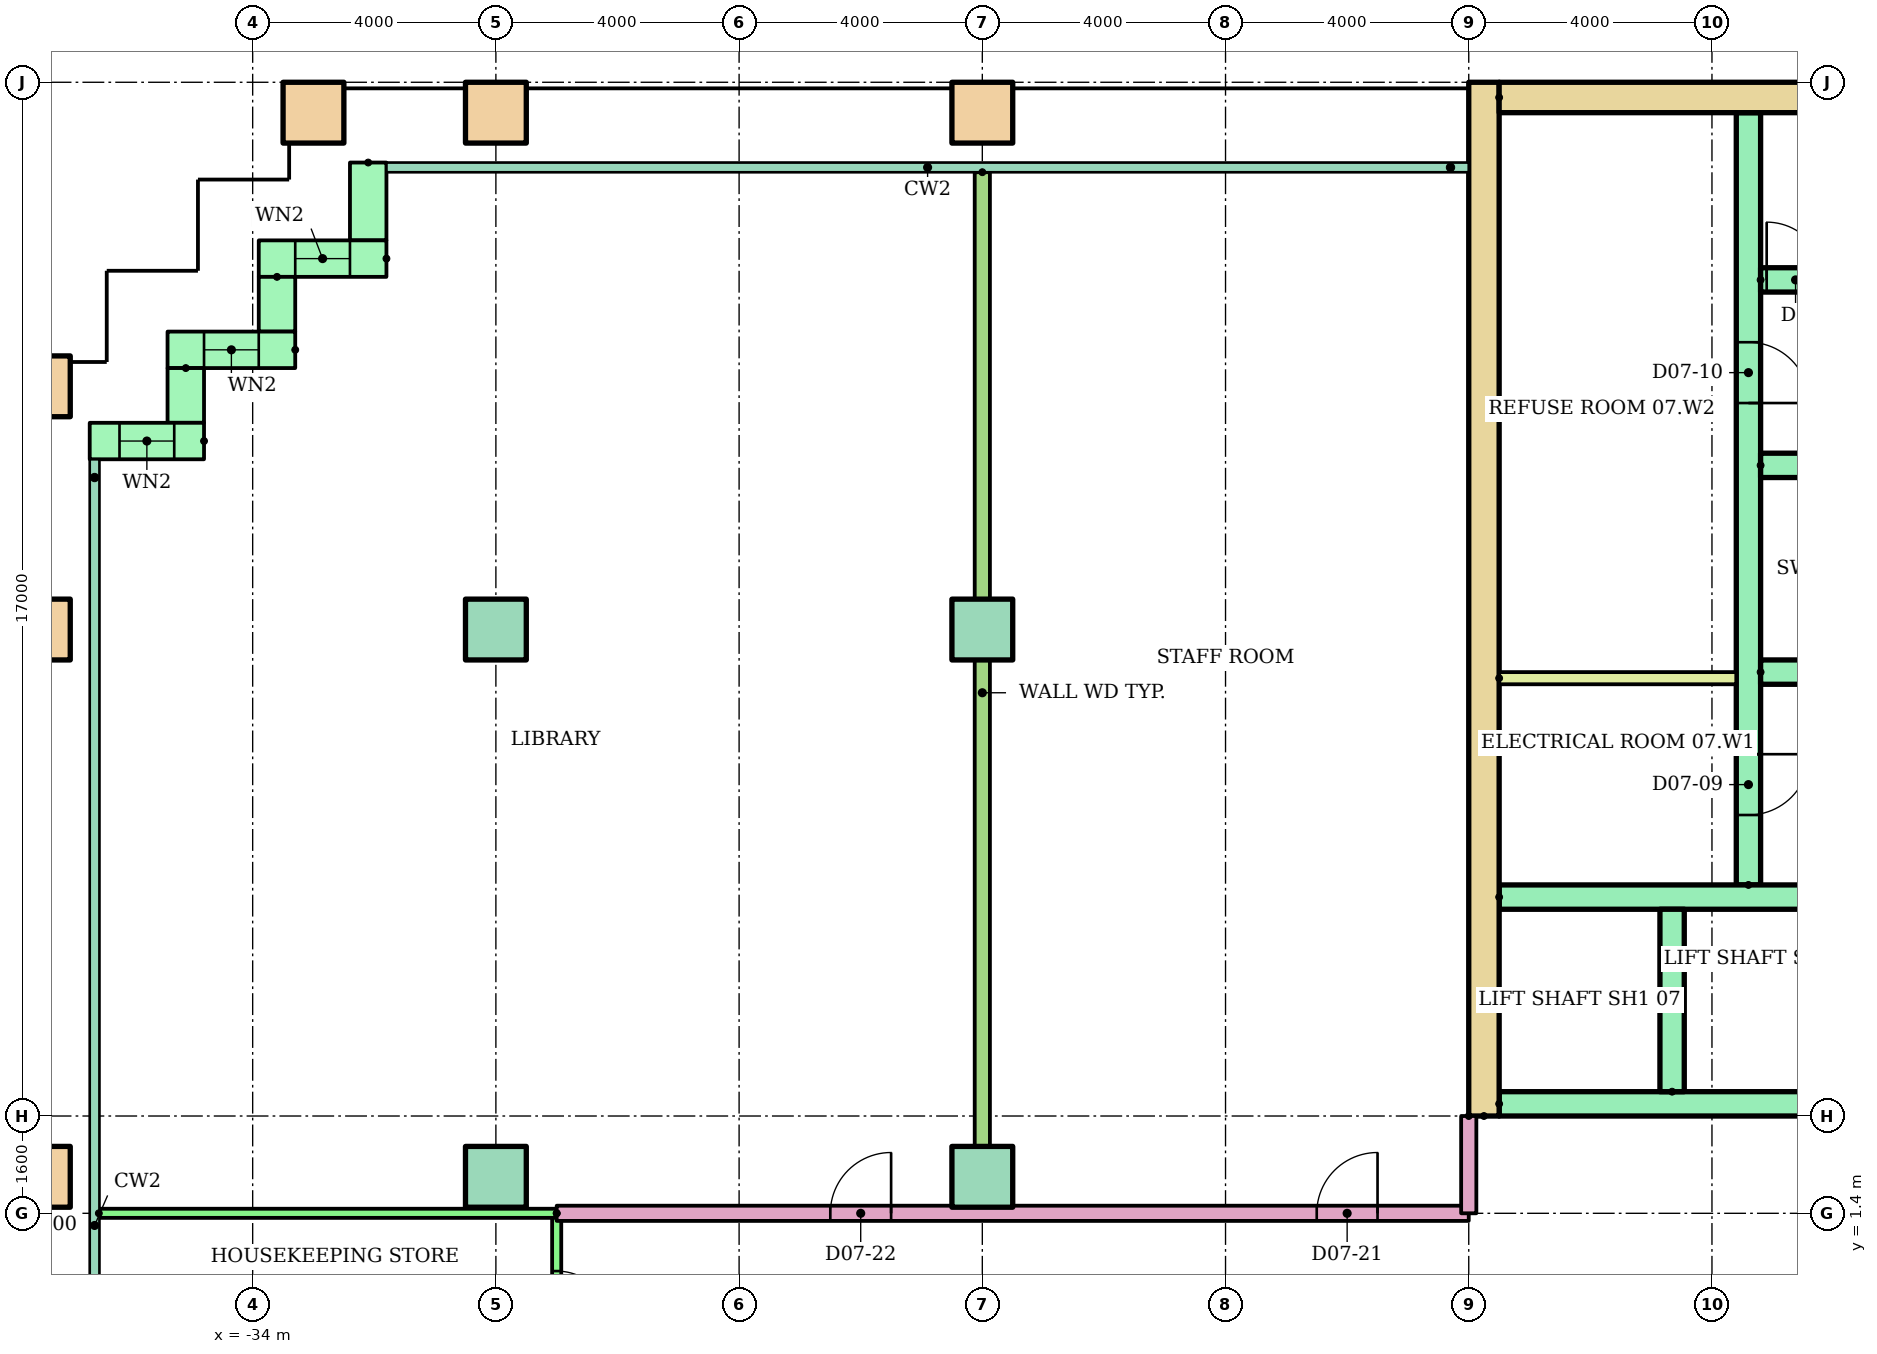
"""IFC4 building model, lengths in metres.
Left out: names, types, materials, properties, quantities, classifications, styles, units other than length and angle.
Written with IfcOpenShell. Run it as: python <this file> out.ifc"""

import sys

from ifc_helpers import new_model, si_unit, direction, frame, frame_2d, origin, origin_2d, place, context, subcontext, project, spatial, rectangle, hollow_rectangle, extrude, element, fill, save


model = new_model("IFC4")
c1 = context("Model", 3, precision=1e-05, world=origin(), true_north=direction((0.0, 1.0)))
c2 = subcontext(c1, "Body", "Model", "MODEL_VIEW")
j1 = project(units=[si_unit("LENGTHUNIT", "METRE"), si_unit("PLANEANGLEUNIT", "RADIAN")], contexts=[c1])
p1 = place(None, origin())
s1 = spatial("IfcSite", under=j1, at=p1, CompositionType="ELEMENT")
p2 = place(p1, origin())
s2 = spatial("IfcBuilding", under=s1, at=p2, CompositionType="ELEMENT")
p3 = place(p2, frame((0.0, 0.0, 29.9)))
s3 = spatial("IfcBuildingStorey", under=s2, at=p3, CompositionType="ELEMENT", Elevation=29.9)
p4 = place(p3, frame((-37.5, 2.0, 0.0)))
e1 = element("IfcColumn", 1, at=p4, inside=s3, PredefinedType="COLUMN", context=c2, shape_type="SweptSolid", body=[
    extrude(hollow_rectangle(XDim=1.0, YDim=1.0, WallThickness=0.05, at=origin_2d()), origin(), (0.0, 0.0, 1.0), 3.9),
])
for number, where in (
    (2, (-30.0, 2.0, 0.0)),
    (3, (-22.0, 2.0, 0.0)),
):
    element("IfcColumn", number, at=place(p3, frame(where)), inside=s3, PredefinedType="COLUMN", context=c2, shape_type="SweptSolid", body=[
        extrude(rectangle(XDim=1.0, YDim=1.0, at=origin_2d()), origin(), (0.0, 0.0, 1.0), 3.9),
    ])
p5 = place(p3, frame((-37.5, 11.0, 0.0)))
e4 = element("IfcColumn", 4, at=p5, inside=s3, PredefinedType="COLUMN", context=c2, shape_type="SweptSolid", body=[
    extrude(hollow_rectangle(XDim=1.0, YDim=1.0, WallThickness=0.05, at=origin_2d()), origin(), (0.0, 0.0, 1.0), 3.9),
])
for number, where in (
    (5, (-30.0, 11.0, 0.0)),
    (6, (-22.0, 11.0, 0.0)),
):
    element("IfcColumn", number, at=place(p3, frame(where)), inside=s3, PredefinedType="COLUMN", context=c2, shape_type="SweptSolid", body=[
        extrude(rectangle(XDim=1.0, YDim=1.0, at=origin_2d()), origin(), (0.0, 0.0, 1.0), 3.9),
    ])
for number, where in (
    (7, (-37.5, 15.0, 0.0)),
    (8, (-33.0, 19.5, 0.0)),
    (9, (-30.0, 19.5, 0.0)),
    (10, (-22.0, 19.5, 0.0)),
):
    element("IfcColumn", number, at=place(p3, frame(where)), inside=s3, PredefinedType="COLUMN", context=c2, shape_type="SweptSolid", body=[
        extrude(hollow_rectangle(XDim=1.0, YDim=1.0, WallThickness=0.05, at=origin_2d()), origin(), (0.0, 0.0, 1.0), 3.9),
    ])
p6 = place(p3, frame((-32.1, 18.68, 0.0), z_axis=(0.0, 0.0, 1.0), x_axis=(0.0, -1.0, 0.0)))
e11 = element("IfcWall", 11, at=p6, inside=s3, PredefinedType="STANDARD", context=c2, shape_type="SweptSolid", body=[
    extrude(rectangle(XDim=1.28, YDim=0.6, at=frame_2d((0.64, 0.0))), origin(), (0.0, 0.0, 1.0), 3.6),
])
p7 = place(p3, frame((-31.8, 17.1, 0.0), z_axis=(0.0, 0.0, 1.0), x_axis=(-1.0, 0.0, 0.0)))
e12 = element("IfcWall", 12, at=p7, inside=s3, PredefinedType="STANDARD", context=c2, shape_type="SweptSolid", body=[
    extrude(rectangle(XDim=2.1, YDim=0.6, at=frame_2d((1.05, 0.0))), origin(), (0.0, 0.0, 1.0), 3.6),
])
p8 = place(p7, frame((0.6, 0.0, 0.9)))
e13 = element("IfcOpeningElement", 13, at=p8, cuts=e12, PredefinedType="OPENING", context=c2, shape_type="SweptSolid", body=[
    extrude(rectangle(XDim=0.9, YDim=1.8, at=frame_2d((0.45, 0.9))), frame((0.0, 0.31, 0.0), z_axis=(0.0, -1.0, 0.0), x_axis=(1.0, 0.0, 0.0)), (0.0, 0.0, 1.0), 0.62),
])
p9 = place(p3, frame((-33.6, 16.8, 0.0), z_axis=(0.0, 0.0, 1.0), x_axis=(0.0, -1.0, 0.0)))
e14 = element("IfcWall", 14, at=p9, inside=s3, PredefinedType="STANDARD", context=c2, shape_type="SweptSolid", body=[
    extrude(rectangle(XDim=0.9, YDim=0.6, at=frame_2d((0.45, 0.0))), origin(), (0.0, 0.0, 1.0), 3.6),
])
p10 = place(p3, frame((-33.3, 15.6, 0.0), z_axis=(0.0, 0.0, 1.0), x_axis=(-1.0, 0.0, 0.0)))
e15 = element("IfcWall", 15, at=p10, inside=s3, PredefinedType="STANDARD", context=c2, shape_type="SweptSolid", body=[
    extrude(rectangle(XDim=2.1, YDim=0.6, at=frame_2d((1.05, 0.0))), origin(), (0.0, 0.0, 1.0), 3.6),
])
p11 = place(p10, frame((0.6, 0.0, 0.9)))
e16 = element("IfcOpeningElement", 16, at=p11, cuts=e15, PredefinedType="OPENING", context=c2, shape_type="SweptSolid", body=[
    extrude(rectangle(XDim=0.9, YDim=1.8, at=frame_2d((0.45, 0.9))), frame((0.0, 0.31, 0.0), z_axis=(0.0, -1.0, 0.0), x_axis=(1.0, 0.0, 0.0)), (0.0, 0.0, 1.0), 0.62),
])
p12 = place(p3, frame((-35.1, 15.3, 0.0), z_axis=(0.0, 0.0, 1.0), x_axis=(0.0, -1.0, 0.0)))
e17 = element("IfcWall", 17, at=p12, inside=s3, PredefinedType="STANDARD", context=c2, shape_type="SweptSolid", body=[
    extrude(rectangle(XDim=0.9, YDim=0.6, at=frame_2d((0.45, 0.0))), origin(), (0.0, 0.0, 1.0), 3.6),
])
p13 = place(p3, frame((-34.8, 14.1, 0.0), z_axis=(0.0, 0.0, 1.0), x_axis=(-1.0, 0.0, 0.0)))
e18 = element("IfcWall", 18, at=p13, inside=s3, PredefinedType="STANDARD", context=c2, shape_type="SweptSolid", body=[
    extrude(rectangle(XDim=1.88, YDim=0.6, at=frame_2d((0.94, 0.0))), origin(), (0.0, 0.0, 1.0), 3.6),
])
p14 = place(p13, frame((0.49, 0.0, 0.9)))
e19 = element("IfcOpeningElement", 19, at=p14, cuts=e18, PredefinedType="OPENING", context=c2, shape_type="SweptSolid", body=[
    extrude(rectangle(XDim=0.9, YDim=1.8, at=frame_2d((0.45, 0.9))), frame((0.0, 0.31, 0.0), z_axis=(0.0, -1.0, 0.0), x_axis=(1.0, 0.0, 0.0)), (0.0, 0.0, 1.0), 0.62),
])
p15 = place(p3, frame((-13.75, 3.0, 0.0), z_axis=(0.0, 0.0, 1.0), x_axis=(0.0, 1.0, 0.0)))
e20 = element("IfcWall", 20, at=p15, inside=s3, PredefinedType="SHEAR", context=c2, shape_type="SweptSolid", body=[
    extrude(rectangle(XDim=17.0, YDim=0.5, at=frame_2d((8.5, 0.0))), origin(), (0.0, 0.0, 1.0), 3.6),
])
p16 = place(p3, frame((-13.5, 19.75, 0.0)))
e21 = element("IfcWall", 21, at=p16, inside=s3, PredefinedType="SHEAR", context=c2, shape_type="SweptSolid", body=[
    extrude(rectangle(XDim=27.0, YDim=0.5, at=frame_2d((13.5, 0.0))), origin(), (0.0, 0.0, 1.0), 3.6),
])
p17 = place(p3, frame((-9.4, 6.8, 0.0), z_axis=(0.0, 0.0, 1.0), x_axis=(0.0, 1.0, 0.0)))
e22 = element("IfcWall", 22, at=p17, inside=s3, PredefinedType="SHEAR", context=c2, shape_type="SweptSolid", body=[
    extrude(rectangle(XDim=12.7, YDim=0.4, at=frame_2d((6.35, 0.0))), origin(), (0.0, 0.0, 1.0), 3.6),
])
p18 = place(p17, frame((1.15, 0.0, 0.0)))
e23 = element("IfcOpeningElement", 23, at=p18, cuts=e22, PredefinedType="OPENING", context=c2, shape_type="SweptSolid", body=[
    extrude(rectangle(XDim=1.0, YDim=2.1, at=frame_2d((0.5, 1.05))), frame((0.0, 0.21, 0.0), z_axis=(0.0, -1.0, 0.0), x_axis=(1.0, 0.0, 0.0)), (0.0, 0.0, 1.0), 0.42),
])
p19 = place(p17, frame((7.925, 0.0, 0.0)))
e24 = element("IfcOpeningElement", 24, at=p19, cuts=e22, PredefinedType="OPENING", context=c2, shape_type="SweptSolid", body=[
    extrude(rectangle(XDim=1.0, YDim=2.1, at=frame_2d((0.5, 1.05))), frame((0.0, 0.21, 0.0), z_axis=(0.0, -1.0, 0.0), x_axis=(1.0, 0.0, 0.0)), (0.0, 0.0, 1.0), 0.42),
])
p20 = place(p3, frame((-13.5, 3.2, 0.0)))
e25 = element("IfcWall", 25, at=p20, inside=s3, PredefinedType="SHEAR", context=c2, shape_type="SweptSolid", body=[
    extrude(rectangle(XDim=27.0, YDim=0.4, at=frame_2d((13.5, 0.0))), origin(), (0.0, 0.0, 1.0), 3.6),
])
p21 = place(p20, frame((6.861, 0.0, 0.0)))
e26 = element("IfcOpeningElement", 26, at=p21, cuts=e25, PredefinedType="OPENING", context=c2, shape_type="SweptSolid", body=[
    extrude(rectangle(XDim=1.1, YDim=2.1, at=frame_2d((0.55, 1.05))), frame((0.0, 0.21, 0.0), z_axis=(0.0, -1.0, 0.0), x_axis=(1.0, 0.0, 0.0)), (0.0, 0.0, 1.0), 0.42),
])
p22 = place(p20, frame((9.906, 0.0, 0.0)))
e27 = element("IfcOpeningElement", 27, at=p22, cuts=e25, PredefinedType="OPENING", context=c2, shape_type="SweptSolid", body=[
    extrude(rectangle(XDim=1.1, YDim=2.1, at=frame_2d((0.55, 1.05))), frame((0.0, 0.21, 0.0), z_axis=(0.0, -1.0, 0.0), x_axis=(1.0, 0.0, 0.0)), (0.0, 0.0, 1.0), 0.42),
])
p23 = place(p20, frame((15.994, 0.0, 0.0)))
e28 = element("IfcOpeningElement", 28, at=p23, cuts=e25, PredefinedType="OPENING", context=c2, shape_type="SweptSolid", body=[
    extrude(rectangle(XDim=1.1, YDim=2.1, at=frame_2d((0.55, 1.05))), frame((0.0, 0.21, 0.0), z_axis=(0.0, -1.0, 0.0), x_axis=(1.0, 0.0, 0.0)), (0.0, 0.0, 1.0), 0.42),
])
p24 = place(p20, frame((19.039, 0.0, 0.0)))
e29 = element("IfcOpeningElement", 29, at=p24, cuts=e25, PredefinedType="OPENING", context=c2, shape_type="SweptSolid", body=[
    extrude(rectangle(XDim=1.1, YDim=2.1, at=frame_2d((0.55, 1.05))), frame((0.0, 0.21, 0.0), z_axis=(0.0, -1.0, 0.0), x_axis=(1.0, 0.0, 0.0)), (0.0, 0.0, 1.0), 0.42),
])
p25 = place(p20, frame((12.6, 0.0, 0.0)))
e30 = element("IfcOpeningElement", 30, at=p25, cuts=e25, PredefinedType="OPENING", context=c2, shape_type="SweptSolid", body=[
    extrude(rectangle(XDim=1.8, YDim=2.1, at=frame_2d((0.9, 1.05))), frame((0.0, 0.21, 0.0), z_axis=(0.0, -1.0, 0.0), x_axis=(1.0, 0.0, 0.0)), (0.0, 0.0, 1.0), 0.42),
])
p26 = place(p3, frame((-13.5, 6.6, 0.0)))
e31 = element("IfcWall", 31, at=p26, inside=s3, PredefinedType="SHEAR", context=c2, shape_type="SweptSolid", body=[
    extrude(rectangle(XDim=11.978, YDim=0.4, at=frame_2d((5.989, 0.0))), origin(), (0.0, 0.0, 1.0), 3.6),
])
p27 = place(p3, frame((-10.656, 3.4, 0.0), z_axis=(0.0, 0.0, 1.0), x_axis=(0.0, 1.0, 0.0)))
e32 = element("IfcWall", 32, at=p27, inside=s3, PredefinedType="SHEAR", context=c2, shape_type="SweptSolid", body=[
    extrude(rectangle(XDim=3.0, YDim=0.4, at=frame_2d((1.5, 0.0))), origin(), (0.0, 0.0, 1.0), 3.6),
])
p28 = place(p3, frame((-9.2, 10.3, 0.0)))
e33 = element("IfcWall", 33, at=p28, inside=s3, PredefinedType="SHEAR", context=c2, shape_type="SweptSolid", body=[
    extrude(rectangle(XDim=8.0, YDim=0.4, at=frame_2d((4.0, 0.0))), origin(), (0.0, 0.0, 1.0), 3.6),
])
p29 = place(p28, frame((2.033, 0.0, 0.0)))
e34 = element("IfcOpeningElement", 34, at=p29, cuts=e33, PredefinedType="OPENING", context=c2, shape_type="SweptSolid", body=[
    extrude(rectangle(XDim=1.0, YDim=2.1, at=frame_2d((0.5, 1.05))), frame((0.0, 0.21, 0.0), z_axis=(0.0, -1.0, 0.0), x_axis=(1.0, 0.0, 0.0)), (0.0, 0.0, 1.0), 0.42),
])
p30 = place(p28, frame((6.133, 0.0, 0.0)))
e35 = element("IfcOpeningElement", 35, at=p30, cuts=e33, PredefinedType="OPENING", context=c2, shape_type="SweptSolid", body=[
    extrude(rectangle(XDim=1.0, YDim=2.1, at=frame_2d((0.5, 1.05))), frame((0.0, 0.21, 0.0), z_axis=(0.0, -1.0, 0.0), x_axis=(1.0, 0.0, 0.0)), (0.0, 0.0, 1.0), 0.42),
])
p31 = place(p3, frame((-9.2, 13.7, 0.0)))
e36 = element("IfcWall", 36, at=p31, inside=s3, PredefinedType="SHEAR", context=c2, shape_type="SweptSolid", body=[
    extrude(rectangle(XDim=8.0, YDim=0.4, at=frame_2d((4.0, 0.0))), origin(), (0.0, 0.0, 1.0), 3.6),
])
p32 = place(p3, frame((-9.2, 16.75, 0.0)))
e37 = element("IfcWall", 37, at=p32, inside=s3, PredefinedType="SHEAR", context=c2, shape_type="SweptSolid", body=[
    extrude(rectangle(XDim=18.4, YDim=0.4, at=frame_2d((9.2, 0.0))), origin(), (0.0, 0.0, 1.0), 3.6),
])
p33 = place(p32, frame((0.1, 0.0, 0.0)))
e38 = element("IfcOpeningElement", 38, at=p33, cuts=e37, PredefinedType="OPENING", context=c2, shape_type="SweptSolid", body=[
    extrude(rectangle(XDim=0.95, YDim=2.1, at=frame_2d((0.475, 1.05))), frame((0.0, 0.21, 0.0), z_axis=(0.0, -1.0, 0.0), x_axis=(1.0, 0.0, 0.0)), (0.0, 0.0, 1.0), 0.42),
])
p34 = place(p32, frame((6.1, 0.0, 0.0)))
e39 = element("IfcOpeningElement", 39, at=p34, cuts=e37, PredefinedType="OPENING", context=c2, shape_type="SweptSolid", body=[
    extrude(rectangle(XDim=0.95, YDim=2.1, at=frame_2d((0.475, 1.05))), frame((0.0, 0.21, 0.0), z_axis=(0.0, -1.0, 0.0), x_axis=(1.0, 0.0, 0.0)), (0.0, 0.0, 1.0), 0.42),
])
p35 = place(p32, frame((12.1, 0.0, 0.0)))
e40 = element("IfcOpeningElement", 40, at=p35, cuts=e37, PredefinedType="OPENING", context=c2, shape_type="SweptSolid", body=[
    extrude(rectangle(XDim=0.95, YDim=2.1, at=frame_2d((0.475, 1.05))), frame((0.0, 0.21, 0.0), z_axis=(0.0, -1.0, 0.0), x_axis=(1.0, 0.0, 0.0)), (0.0, 0.0, 1.0), 0.42),
])
p36 = place(p3, frame((-13.5, 10.2, 0.0)))
e41 = element("IfcWall", 41, at=p36, inside=s3, PredefinedType="PARTITIONING", context=c2, shape_type="SweptSolid", body=[
    extrude(rectangle(XDim=3.9, YDim=0.2, at=frame_2d((1.95, 0.0))), origin(), (0.0, 0.0, 1.0), 3.6),
])
p37 = place(p3, frame((-29.0, 1.4, 0.0), z_axis=(0.0, 0.0, 1.0), x_axis=(0.0, -1.0, 0.0)))
e42 = element("IfcWall", 42, at=p37, inside=s3, PredefinedType="PARTITIONING", context=c2, shape_type="SweptSolid", body=[
    extrude(rectangle(XDim=2.8, YDim=0.15, at=frame_2d((1.4, 0.0))), origin(), (0.0, 0.0, 1.0), 3.1),
])
p38 = place(p37, frame((0.95, 0.0, 0.0)))
e43 = element("IfcOpeningElement", 43, at=p38, cuts=e42, PredefinedType="OPENING", context=c2, shape_type="SweptSolid", body=[
    extrude(rectangle(XDim=0.9, YDim=2.1, at=frame_2d((0.45, 1.05))), frame((0.0, 0.085, 0.0), z_axis=(0.0, -1.0, 0.0), x_axis=(1.0, 0.0, 0.0)), (0.0, 0.0, 1.0), 0.17),
])
p39 = place(p3, frame((-29.0, 1.4, 0.0)))
e44 = element("IfcWall", 44, at=p39, inside=s3, PredefinedType="PARTITIONING", context=c2, shape_type="SweptSolid", body=[
    extrude(rectangle(XDim=15.0, YDim=0.25, at=frame_2d((7.5, 0.0))), origin(), (0.0, 0.0, 1.0), 3.1),
])
p40 = place(p39, frame((12.5, 0.0, 0.0)))
e45 = element("IfcOpeningElement", 45, at=p40, cuts=e44, PredefinedType="OPENING", context=c2, shape_type="SweptSolid", body=[
    extrude(rectangle(XDim=1.0, YDim=2.1, at=frame_2d((0.5, 1.05))), frame((0.0, 0.135, 0.0), z_axis=(0.0, -1.0, 0.0), x_axis=(1.0, 0.0, 0.0)), (0.0, 0.0, 1.0), 0.27),
])
p41 = place(p39, frame((4.5, 0.0, 0.0)))
e46 = element("IfcOpeningElement", 46, at=p41, cuts=e44, PredefinedType="OPENING", context=c2, shape_type="SweptSolid", body=[
    extrude(rectangle(XDim=1.0, YDim=2.1, at=frame_2d((0.5, 1.05))), frame((0.0, 0.135, 0.0), z_axis=(0.0, -1.0, 0.0), x_axis=(1.0, 0.0, 0.0)), (0.0, 0.0, 1.0), 0.27),
])
p42 = place(p3, frame((-36.53, 1.4, 0.0)))
e47 = element("IfcWall", 47, at=p42, inside=s3, PredefinedType="PARTITIONING", context=c2, shape_type="SweptSolid", body=[
    extrude(rectangle(XDim=7.53, YDim=0.15, at=frame_2d((3.765, 0.0))), origin(), (0.0, 0.0, 1.0), 3.1),
])
p43 = place(p3, frame((-22.0, 18.521, 0.0), z_axis=(0.0, 0.0, 1.0), x_axis=(0.0, -1.0, 0.0)))
e48 = element("IfcWall", 48, at=p43, inside=s3, PredefinedType="PARTITIONING", context=c2, shape_type="SweptSolid", body=[
    extrude(rectangle(XDim=17.121, YDim=0.25, at=frame_2d((8.561, 0.0))), origin(), (0.0, 0.0, 1.0), 3.1),
])
p44 = place(p3, frame((-14.0, 3.0, 0.0), z_axis=(0.0, 0.0, 1.0), x_axis=(0.0, -1.0, 0.0)))
e49 = element("IfcWall", 49, at=p44, inside=s3, PredefinedType="PARTITIONING", context=c2, shape_type="SweptSolid", body=[
    extrude(rectangle(XDim=1.6, YDim=0.25, at=frame_2d((0.8, 0.0))), origin(), (0.0, 0.0, 1.0), 3.1),
])
p45 = place(p8, origin())
e50 = element("IfcWindow", 50, at=p45, inside=s3, PartitioningType="SINGLE_PANEL", PredefinedType="WINDOW", context=c2, shape_type="SweptSolid", body=[
    extrude(rectangle(XDim=0.9, YDim=1.8, at=frame_2d((0.45, 0.9))), frame((0.0, 0.03, 0.0), z_axis=(0.0, -1.0, 0.0), x_axis=(1.0, 0.0, 0.0)), (0.0, 0.0, 1.0), 0.06),
])
fill(e13, e50)
p46 = place(p11, origin())
e51 = element("IfcWindow", 51, at=p46, inside=s3, PartitioningType="SINGLE_PANEL", PredefinedType="WINDOW", context=c2, shape_type="SweptSolid", body=[
    extrude(rectangle(XDim=0.9, YDim=1.8, at=frame_2d((0.45, 0.9))), frame((0.0, 0.03, 0.0), z_axis=(0.0, -1.0, 0.0), x_axis=(1.0, 0.0, 0.0)), (0.0, 0.0, 1.0), 0.06),
])
fill(e16, e51)
p47 = place(p14, origin())
e52 = element("IfcWindow", 52, at=p47, inside=s3, PartitioningType="SINGLE_PANEL", PredefinedType="WINDOW", context=c2, shape_type="SweptSolid", body=[
    extrude(rectangle(XDim=0.9, YDim=1.8, at=frame_2d((0.45, 0.9))), frame((0.0, 0.03, 0.0), z_axis=(0.0, -1.0, 0.0), x_axis=(1.0, 0.0, 0.0)), (0.0, 0.0, 1.0), 0.06),
])
fill(e19, e52)
p48 = place(p33, origin())
e53 = element("IfcDoor", 53, at=p48, inside=s3, OperationType="SINGLE_SWING_LEFT", PredefinedType="DOOR", context=c2, shape_type="SweptSolid", body=[
    extrude(rectangle(XDim=0.95, YDim=2.1, at=frame_2d((0.475, 1.05))), frame((0.0, 0.025, 0.0), z_axis=(0.0, -1.0, 0.0), x_axis=(1.0, 0.0, 0.0)), (0.0, 0.0, 1.0), 0.05),
])
fill(e38, e53)
p49 = place(p18, frame((1.0, 0.0, 0.0), z_axis=(0.0, 0.0, 1.0), x_axis=(-1.0, 0.0, 0.0)))
e54 = element("IfcDoor", 54, at=p49, inside=s3, OperationType="SINGLE_SWING_RIGHT", PredefinedType="DOOR", context=c2, shape_type="SweptSolid", body=[
    extrude(rectangle(XDim=1.0, YDim=2.1, at=frame_2d((0.5, 1.05))), frame((0.0, 0.025, 0.0), z_axis=(0.0, -1.0, 0.0), x_axis=(1.0, 0.0, 0.0)), (0.0, 0.0, 1.0), 0.05),
])
fill(e23, e54)
p50 = place(p19, frame((1.0, 0.0, 0.0), z_axis=(0.0, 0.0, 1.0), x_axis=(-1.0, 0.0, 0.0)))
e55 = element("IfcDoor", 55, at=p50, inside=s3, OperationType="SINGLE_SWING_LEFT", PredefinedType="DOOR", context=c2, shape_type="SweptSolid", body=[
    extrude(rectangle(XDim=1.0, YDim=2.1, at=frame_2d((0.5, 1.05))), frame((0.0, 0.025, 0.0), z_axis=(0.0, -1.0, 0.0), x_axis=(1.0, 0.0, 0.0)), (0.0, 0.0, 1.0), 0.05),
])
fill(e24, e55)
p51 = place(p38, origin())
e56 = element("IfcDoor", 56, at=p51, inside=s3, OperationType="SINGLE_SWING_RIGHT", PredefinedType="DOOR", context=c2, shape_type="SweptSolid", body=[
    extrude(rectangle(XDim=0.9, YDim=2.1, at=frame_2d((0.45, 1.05))), frame((0.0, 0.025, 0.0), z_axis=(0.0, -1.0, 0.0), x_axis=(1.0, 0.0, 0.0)), (0.0, 0.0, 1.0), 0.05),
])
fill(e43, e56)
p52 = place(p40, origin())
e57 = element("IfcDoor", 57, at=p52, inside=s3, OperationType="SINGLE_SWING_RIGHT", PredefinedType="DOOR", context=c2, shape_type="SweptSolid", body=[
    extrude(rectangle(XDim=1.0, YDim=2.1, at=frame_2d((0.5, 1.05))), frame((0.0, 0.025, 0.0), z_axis=(0.0, -1.0, 0.0), x_axis=(1.0, 0.0, 0.0)), (0.0, 0.0, 1.0), 0.05),
])
fill(e45, e57)
p53 = place(p41, origin())
e58 = element("IfcDoor", 58, at=p53, inside=s3, OperationType="SINGLE_SWING_RIGHT", PredefinedType="DOOR", context=c2, shape_type="SweptSolid", body=[
    extrude(rectangle(XDim=1.0, YDim=2.1, at=frame_2d((0.5, 1.05))), frame((0.0, 0.025, 0.0), z_axis=(0.0, -1.0, 0.0), x_axis=(1.0, 0.0, 0.0)), (0.0, 0.0, 1.0), 0.05),
])
fill(e46, e58)
save(model, sys.argv[1])
